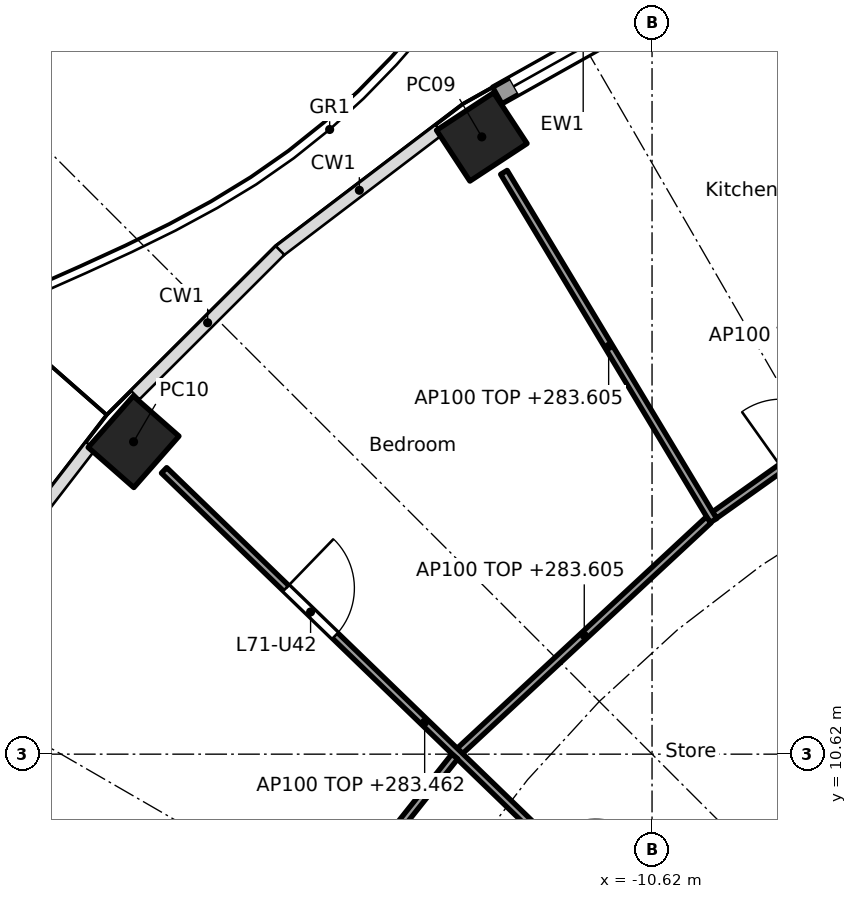
"""IFC4 building model, lengths in metres.
Left out: names, types, materials, properties, quantities, classifications, styles, units other than length and angle.
Written with IfcOpenShell. Run it as: python <this file> out.ifc"""

import sys

from ifc_helpers import new_model, si_unit, direction, frame, frame_2d, origin, origin_2d, place, context, subcontext, project, spatial, rectangle, hollow_rectangle, extrude, element, fill, save


model = new_model("IFC4")
c1 = context("Model", 3, precision=1e-05, world=origin(), true_north=direction((0.0, 1.0)))
c2 = subcontext(c1, "Body", "Model", "MODEL_VIEW")
j1 = project(units=[si_unit("LENGTHUNIT", "METRE"), si_unit("PLANEANGLEUNIT", "RADIAN")], contexts=[c1])
p1 = place(None, origin())
s1 = spatial("IfcSite", under=j1, at=p1, CompositionType="ELEMENT")
p2 = place(p1, origin())
s2 = spatial("IfcBuilding", under=s1, at=p2, CompositionType="ELEMENT")
p3 = place(p2, frame((0.0, 0.0, 280.7)))
s3 = spatial("IfcBuildingStorey", under=s2, at=p3, CompositionType="ELEMENT", Elevation=280.7)
for number, where, z_axis, x_axis in (
    (1, (-12.86, 18.741, 0.0), (0.0, 0.0, 1.0), (-0.836, -0.549, 0.0)),
    (2, (-17.441, 14.73, 0.0), (0.0, 0.0, 1.0), (-0.66, -0.751, 0.0)),
):
    element("IfcColumn", number, at=place(p3, frame(where, z_axis=z_axis, x_axis=x_axis)), inside=s3, PredefinedType="COLUMN", context=c2, shape_type="SweptSolid", body=[
        extrude(hollow_rectangle(XDim=0.9, YDim=0.8, WallThickness=0.028, at=origin_2d()), origin(), (0.0, 0.0, 1.0), 3.7),
    ])
p4 = place(p3, frame((-12.656, 19.285, 0.0), z_axis=(0.0, 0.0, 1.0), x_axis=(0.872075426507, 0.489371485154, 0.0)))
e3 = element("IfcWall", 3, at=p4, inside=s3, PredefinedType="SOLIDWALL", context=c2, shape_type="SweptSolid", body=[
    extrude(rectangle(XDim=2.593, YDim=0.25, at=frame_2d((1.297, 0.0))), origin(), (0.0, 0.0, 1.0), 3.44),
])
p5 = place(p4, frame((0.247, 0.0, 0.0)))
e4 = element("IfcOpeningElement", 4, at=p5, cuts=e3, PredefinedType="OPENING", context=c2, shape_type="SweptSolid", body=[
    extrude(rectangle(XDim=2.1, YDim=2.4, at=frame_2d((1.05, 1.2))), frame((0.0, 0.135, 0.0), z_axis=(0.0, -1.0, 0.0), x_axis=(1.0, 0.0, 0.0)), (0.0, 0.0, 1.0), 0.27),
])
p6 = place(p3, frame((-4.613, 9.988, 0.0), z_axis=(0.0, 0.0, 1.0), x_axis=(-0.707106781187, -0.707106781187, 0.0)))
e5 = element("IfcWall", 5, at=p6, inside=s3, PredefinedType="SHEAR", context=c2, shape_type="SweptSolid", body=[
    extrude(rectangle(XDim=7.602, YDim=0.6, at=frame_2d((3.801, 0.0))), origin(), (0.0, 0.0, 1.0), 3.44),
])
p7 = place(p6, frame((0.351, 0.0, 0.0)))
e6 = element("IfcOpeningElement", 6, at=p7, cuts=e5, PredefinedType="OPENING", context=c2, shape_type="SweptSolid", body=[
    extrude(rectangle(XDim=1.1, YDim=2.1, at=frame_2d((0.55, 1.05))), frame((0.0, 0.31, 0.0), z_axis=(0.0, -1.0, 0.0), x_axis=(1.0, 0.0, 0.0)), (0.0, 0.0, 1.0), 0.62),
])
p8 = place(p3, frame((-5.275, 12.494, 0.0), z_axis=(0.0, 0.0, 1.0), x_axis=(-0.707106781187, -0.707106781187, 0.0)))
e7 = element("IfcWall", 7, at=p8, inside=s3, PredefinedType="PARTITIONING", context=c2, shape_type="SweptSolid", body=[
    extrude(rectangle(XDim=10.209, YDim=0.2, at=frame_2d((5.104, 0.0))), origin(), (0.0, 0.0, 1.0), 3.44),
])
p9 = place(p3, frame((-6.508, 16.103, 0.0), z_axis=(0.0, 0.0, 1.0), x_axis=(-0.815202203556, -0.579176456114, 0.0)))
e8 = element("IfcWall", 8, at=p9, inside=s3, PredefinedType="PARTITIONING", context=c2, shape_type="SweptSolid", body=[
    extrude(rectangle(XDim=4.036, YDim=0.1, at=frame_2d((2.018, 0.0))), origin(), (0.0, 0.0, 1.0), 2.905),
])
p10 = place(p9, frame((2.055, 0.0, 0.0)))
e9 = element("IfcOpeningElement", 9, at=p10, cuts=e8, PredefinedType="OPENING", context=c2, shape_type="SweptSolid", body=[
    extrude(rectangle(XDim=0.9, YDim=2.1, at=frame_2d((0.45, 1.05))), frame((0.0, 0.06, 0.0), z_axis=(0.0, -1.0, 0.0), x_axis=(1.0, 0.0, 0.0)), (0.0, 0.0, 1.0), 0.12),
])
p11 = place(p3, frame((-9.813, 13.693, 0.0), z_axis=(0.0, 0.0, 1.0), x_axis=(-0.515509511815, 0.856883856324, 0.0)))
e10 = element("IfcWall", 10, at=p11, inside=s3, PredefinedType="PARTITIONING", context=c2, shape_type="SweptSolid", body=[
    extrude(rectangle(XDim=5.346, YDim=0.1, at=frame_2d((2.673, 0.0))), origin(), (0.0, 0.0, 1.0), 2.905),
])
p12 = place(p3, frame((-9.875, 13.702, 0.0), z_axis=(0.0, 0.0, 1.0), x_axis=(-0.732618266441, -0.680639754699, 0.0)))
e11 = element("IfcWall", 11, at=p12, inside=s3, PredefinedType="PARTITIONING", context=c2, shape_type="SweptSolid", body=[
    extrude(rectangle(XDim=4.467, YDim=0.1, at=frame_2d((2.233, 0.0))), origin(), (0.0, 0.0, 1.0), 2.905),
])
p13 = place(p3, frame((-10.183, 7.727, 0.0), z_axis=(0.0, 0.0, 1.0), x_axis=(-0.719063433856, 0.694944442449, 0.0)))
e12 = element("IfcWall", 12, at=p13, inside=s3, PredefinedType="PARTITIONING", context=c2, shape_type="SweptSolid", body=[
    extrude(rectangle(XDim=9.535, YDim=0.1, at=frame_2d((4.768, 0.0))), origin(), (0.0, 0.0, 1.0), 2.762),
])
p14 = place(p13, frame((6.405, 0.0, 0.0)))
e13 = element("IfcOpeningElement", 13, at=p14, cuts=e12, PredefinedType="OPENING", context=c2, shape_type="SweptSolid", body=[
    extrude(rectangle(XDim=0.9, YDim=2.1, at=frame_2d((0.45, 1.05))), frame((0.0, 0.06, 0.0), z_axis=(0.0, -1.0, 0.0), x_axis=(1.0, 0.0, 0.0)), (0.0, 0.0, 1.0), 0.12),
])
p15 = place(p13, frame((1.637, 0.0, 0.0)))
e14 = element("IfcOpeningElement", 14, at=p15, cuts=e12, PredefinedType="OPENING", context=c2, shape_type="SweptSolid", body=[
    extrude(rectangle(XDim=0.9, YDim=2.1, at=frame_2d((0.45, 1.05))), frame((0.0, 0.06, 0.0), z_axis=(0.0, -1.0, 0.0), x_axis=(1.0, 0.0, 0.0)), (0.0, 0.0, 1.0), 0.12),
])
p16 = place(p3, frame((-13.216, 10.589, 0.0), z_axis=(0.0, 0.0, 1.0), x_axis=(-0.622272178674, -0.782800955319, 0.0)))
e15 = element("IfcWall", 15, at=p16, inside=s3, PredefinedType="PARTITIONING", context=c2, shape_type="SweptSolid", body=[
    extrude(rectangle(XDim=4.786, YDim=0.1, at=frame_2d((2.393, 0.0))), origin(), (0.0, 0.0, 1.0), 2.905),
])
p17 = place(p16, frame((1.918, 0.0, 0.0)))
e16 = element("IfcOpeningElement", 16, at=p17, cuts=e15, PredefinedType="OPENING", context=c2, shape_type="SweptSolid", body=[
    extrude(rectangle(XDim=0.9, YDim=2.1, at=frame_2d((0.45, 1.05))), frame((0.0, 0.06, 0.0), z_axis=(0.0, -1.0, 0.0), x_axis=(1.0, 0.0, 0.0)), (0.0, 0.0, 1.0), 0.12),
])
p18 = place(p5, origin())
e17 = element("IfcDoor", 17, at=p18, inside=s3, OperationType="SLIDING_TO_LEFT", PredefinedType="DOOR", context=c2, shape_type="SweptSolid", body=[
    extrude(rectangle(XDim=2.1, YDim=2.4, at=frame_2d((1.05, 1.2))), frame((0.0, 0.025, 0.0), z_axis=(0.0, -1.0, 0.0), x_axis=(1.0, 0.0, 0.0)), (0.0, 0.0, 1.0), 0.05),
])
fill(e4, e17)
p19 = place(p14, frame((0.9, 0.0, 0.0), x_axis=(-1.0, 0.0, 0.0)))
e18 = element("IfcDoor", 18, at=p19, inside=s3, OperationType="SINGLE_SWING_LEFT", PredefinedType="DOOR", context=c2, shape_type="SweptSolid", body=[
    extrude(rectangle(XDim=0.9, YDim=2.1, at=frame_2d((0.45, 1.05))), frame((0.0, 0.025, 0.0), z_axis=(0.0, -1.0, 0.0), x_axis=(1.0, 0.0, 0.0)), (0.0, 0.0, 1.0), 0.05),
])
fill(e13, e18)
save(model, sys.argv[1])
